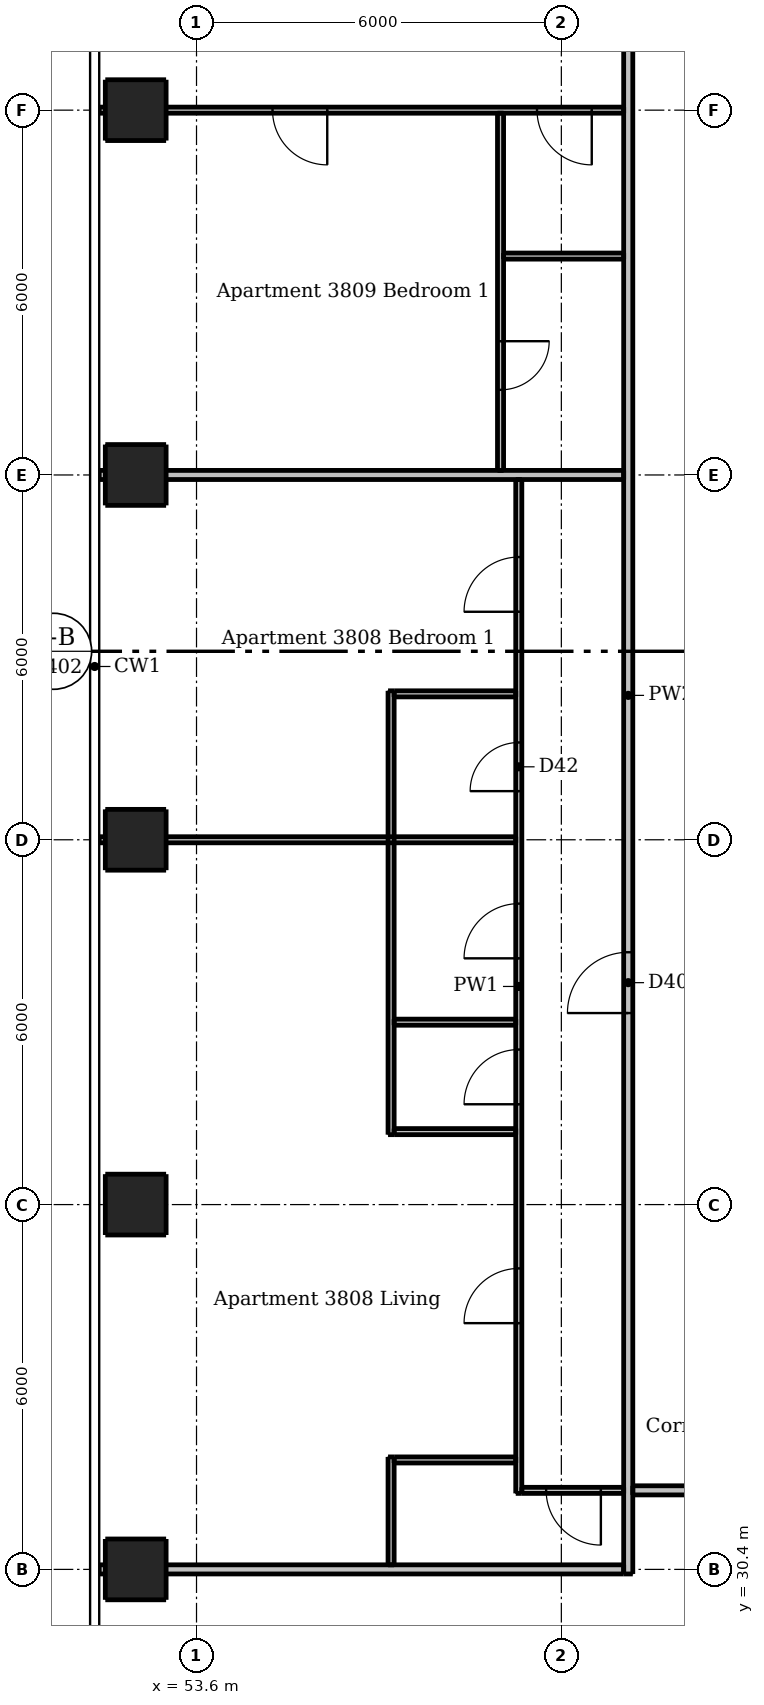
"""IFC4 building model, lengths in metres.
Left out: names, types, materials, properties, quantities, classifications, styles, units other than length and angle.
Written with IfcOpenShell. Run it as: python <this file> out.ifc"""

import sys

from ifc_helpers import new_model, si_unit, direction, frame, frame_2d, origin, origin_2d, place, context, subcontext, project, spatial, rectangle, extrude, element, fill, save


model = new_model("IFC4")
c1 = context("Model", 3, precision=1e-05, world=origin(), true_north=direction((0.0, 1.0)))
c2 = subcontext(c1, "Body", "Model", "MODEL_VIEW")
j1 = project(units=[si_unit("LENGTHUNIT", "METRE"), si_unit("PLANEANGLEUNIT", "RADIAN")], contexts=[c1])
p1 = place(None, origin())
s1 = spatial("IfcSite", under=j1, at=p1, CompositionType="ELEMENT")
p2 = place(p1, origin())
s2 = spatial("IfcBuilding", under=s1, at=p2, CompositionType="ELEMENT")
p3 = place(p2, frame((0.0, 0.0, 143.8)))
s3 = spatial("IfcBuildingStorey", under=s2, at=p3, CompositionType="ELEMENT", Elevation=143.8)
for number, where, z_axis, x_axis in (
    (1, (52.6, 30.4, 0.0), (0.0, 0.0, 1.0), (1.0, 0.0, 0.0)),
    (2, (52.6, 36.4, 0.0), (0.0, 0.0, 1.0), (1.0, 0.0, 0.0)),
    (3, (52.6, 42.4, 0.0), (0.0, 0.0, 1.0), (1.0, 0.0, 0.0)),
    (4, (52.6, 48.4, 0.0), (0.0, 0.0, 1.0), (1.0, 0.0, 0.0)),
    (5, (52.6, 54.4, 0.0), (0.0, 0.0, 1.0), (1.0, 0.0, 0.0)),
):
    element("IfcColumn", number, at=place(p3, frame(where, z_axis=z_axis, x_axis=x_axis)), inside=s3, PredefinedType="COLUMN", context=c2, shape_type="SweptSolid", body=[
        extrude(rectangle(XDim=1.0, YDim=1.0, at=origin_2d()), origin(), (0.0, 0.0, 1.0), 3.05),
    ])
p4 = place(p3, frame((56.8, 30.475, 0.0), z_axis=(0.0, 0.0, 1.0), x_axis=(0.0, 1.0, 0.0)))
e6 = element("IfcWall", 6, at=p4, inside=s3, PredefinedType="PARTITIONING", context=c2, shape_type="SweptSolid", body=[
    extrude(rectangle(XDim=1.775, YDim=0.1, at=frame_2d((0.887, 0.0))), origin(), (0.0, 0.0, 1.0), 3.05),
])
p5 = place(p3, frame((56.8, 37.55, 0.0), z_axis=(0.0, 0.0, 1.0), x_axis=(0.0, 1.0, 0.0)))
e7 = element("IfcWall", 7, at=p5, inside=s3, PredefinedType="PARTITIONING", context=c2, shape_type="SweptSolid", body=[
    extrude(rectangle(XDim=7.3, YDim=0.1, at=frame_2d((3.65, 0.0))), origin(), (0.0, 0.0, 1.0), 3.05),
])
p6 = place(p3, frame((58.6, 54.35, 0.0), z_axis=(0.0, 0.0, 1.0), x_axis=(0.0, -1.0, 0.0)))
e8 = element("IfcWall", 8, at=p6, inside=s3, PredefinedType="PARTITIONING", context=c2, shape_type="SweptSolid", body=[
    extrude(rectangle(XDim=5.875, YDim=0.1, at=frame_2d((2.938, 0.0))), origin(), (0.0, 0.0, 1.0), 3.05),
])
p7 = place(p6, frame((3.75, 0.0, 0.0)))
e9 = element("IfcOpeningElement", 9, at=p7, cuts=e8, PredefinedType="OPENING", context=c2, shape_type="SweptSolid", body=[
    extrude(rectangle(XDim=0.8, YDim=2.1, at=frame_2d((0.4, 1.05))), frame((0.0, 0.06, 0.0), z_axis=(0.0, -1.0, 0.0), x_axis=(1.0, 0.0, 0.0)), (0.0, 0.0, 1.0), 0.12),
])
p8 = place(p3, frame((58.9, 31.65, 0.0), z_axis=(0.0, 0.0, 1.0), x_axis=(0.0, 1.0, 0.0)))
e10 = element("IfcWall", 10, at=p8, inside=s3, PredefinedType="PARTITIONING", context=c2, shape_type="SweptSolid", body=[
    extrude(rectangle(XDim=16.675, YDim=0.1, at=frame_2d((8.337, 0.0))), origin(), (0.0, 0.0, 1.0), 3.05),
])
p9 = place(p8, frame((2.8, 0.0, 0.0)))
e11 = element("IfcOpeningElement", 11, at=p9, cuts=e10, PredefinedType="OPENING", context=c2, shape_type="SweptSolid", body=[
    extrude(rectangle(XDim=0.9, YDim=2.1, at=frame_2d((0.45, 1.05))), frame((0.0, 0.06, 0.0), z_axis=(0.0, -1.0, 0.0), x_axis=(1.0, 0.0, 0.0)), (0.0, 0.0, 1.0), 0.12),
])
p10 = place(p8, frame((8.8, 0.0, 0.0)))
e12 = element("IfcOpeningElement", 12, at=p10, cuts=e10, PredefinedType="OPENING", context=c2, shape_type="SweptSolid", body=[
    extrude(rectangle(XDim=0.9, YDim=2.1, at=frame_2d((0.45, 1.05))), frame((0.0, 0.06, 0.0), z_axis=(0.0, -1.0, 0.0), x_axis=(1.0, 0.0, 0.0)), (0.0, 0.0, 1.0), 0.12),
])
p11 = place(p8, frame((6.4, 0.0, 0.0)))
e13 = element("IfcOpeningElement", 13, at=p11, cuts=e10, PredefinedType="OPENING", context=c2, shape_type="SweptSolid", body=[
    extrude(rectangle(XDim=0.9, YDim=2.1, at=frame_2d((0.45, 1.05))), frame((0.0, 0.06, 0.0), z_axis=(0.0, -1.0, 0.0), x_axis=(1.0, 0.0, 0.0)), (0.0, 0.0, 1.0), 0.12),
])
p12 = place(p8, frame((14.5, 0.0, 0.0)))
e14 = element("IfcOpeningElement", 14, at=p12, cuts=e10, PredefinedType="OPENING", context=c2, shape_type="SweptSolid", body=[
    extrude(rectangle(XDim=0.9, YDim=2.1, at=frame_2d((0.45, 1.05))), frame((0.0, 0.06, 0.0), z_axis=(0.0, -1.0, 0.0), x_axis=(1.0, 0.0, 0.0)), (0.0, 0.0, 1.0), 0.12),
])
p13 = place(p8, frame((11.55, 0.0, 0.0)))
e15 = element("IfcOpeningElement", 15, at=p13, cuts=e10, PredefinedType="OPENING", context=c2, shape_type="SweptSolid", body=[
    extrude(rectangle(XDim=0.8, YDim=2.1, at=frame_2d((0.4, 1.05))), frame((0.0, 0.06, 0.0), z_axis=(0.0, -1.0, 0.0), x_axis=(1.0, 0.0, 0.0)), (0.0, 0.0, 1.0), 0.12),
])
p14 = place(p3, frame((60.625, 54.4, 0.0), z_axis=(0.0, 0.0, 1.0), x_axis=(-1.0, 0.0, 0.0)))
e16 = element("IfcWall", 16, at=p14, inside=s3, PredefinedType="PARTITIONING", context=c2, shape_type="SweptSolid", body=[
    extrude(rectangle(XDim=8.625, YDim=0.1, at=frame_2d((4.312, 0.0))), origin(), (0.0, 0.0, 1.0), 2.516),
])
p15 = place(p14, frame((0.525, 0.0, 0.0)))
e17 = element("IfcOpeningElement", 17, at=p15, cuts=e16, PredefinedType="OPENING", context=c2, shape_type="SweptSolid", body=[
    extrude(rectangle(XDim=0.9, YDim=2.1, at=frame_2d((0.45, 1.05))), frame((0.0, 0.06, 0.0), z_axis=(0.0, -1.0, 0.0), x_axis=(1.0, 0.0, 0.0)), (0.0, 0.0, 1.0), 0.12),
])
p16 = place(p14, frame((4.875, 0.0, 0.0)))
e18 = element("IfcOpeningElement", 18, at=p16, cuts=e16, PredefinedType="OPENING", context=c2, shape_type="SweptSolid", body=[
    extrude(rectangle(XDim=0.9, YDim=2.1, at=frame_2d((0.45, 1.05))), frame((0.0, 0.06, 0.0), z_axis=(0.0, -1.0, 0.0), x_axis=(1.0, 0.0, 0.0)), (0.0, 0.0, 1.0), 0.12),
])
p17 = place(p3, frame((58.65, 52.0, 0.0), z_axis=(0.0, 0.0, 1.0), x_axis=(1.0, 0.0, 0.0)))
e19 = element("IfcWall", 19, at=p17, inside=s3, PredefinedType="PARTITIONING", context=c2, shape_type="SweptSolid", body=[
    extrude(rectangle(XDim=1.975, YDim=0.1, at=frame_2d((0.988, 0.0))), origin(), (0.0, 0.0, 1.0), 3.05),
])
p18 = place(p3, frame((56.85, 44.8, 0.0), z_axis=(0.0, 0.0, 1.0), x_axis=(1.0, 0.0, 0.0)))
e20 = element("IfcWall", 20, at=p18, inside=s3, PredefinedType="PARTITIONING", context=c2, shape_type="SweptSolid", body=[
    extrude(rectangle(XDim=2.0, YDim=0.1, at=frame_2d((1.0, 0.0))), origin(), (0.0, 0.0, 1.0), 3.05),
])
p19 = place(p3, frame((52.0, 42.4, 0.0), z_axis=(0.0, 0.0, 1.0), x_axis=(1.0, 0.0, 0.0)))
e21 = element("IfcWall", 21, at=p19, inside=s3, PredefinedType="PARTITIONING", context=c2, shape_type="SweptSolid", body=[
    extrude(rectangle(XDim=6.85, YDim=0.1, at=frame_2d((3.425, 0.0))), origin(), (0.0, 0.0, 1.0), 2.516),
])
for number, where, z_axis, x_axis in (
    (22, (56.85, 39.4, 0.0), (0.0, 0.0, 1.0), (1.0, 0.0, 0.0)),
    (23, (56.85, 37.6, 0.0), (0.0, 0.0, 1.0), (1.0, 0.0, 0.0)),
    (24, (56.85, 32.2, 0.0), (0.0, 0.0, 1.0), (1.0, 0.0, 0.0)),
):
    element("IfcWall", number, at=place(p3, frame(where, z_axis=z_axis, x_axis=x_axis)), inside=s3, PredefinedType="PARTITIONING", context=c2, shape_type="SweptSolid", body=[
        extrude(rectangle(XDim=2.0, YDim=0.1, at=frame_2d((1.0, 0.0))), origin(), (0.0, 0.0, 1.0), 3.05),
    ])
p20 = place(p3, frame((60.625, 31.7, 0.0), z_axis=(0.0, 0.0, 1.0), x_axis=(-1.0, 0.0, 0.0)))
e25 = element("IfcWall", 25, at=p20, inside=s3, PredefinedType="PARTITIONING", context=c2, shape_type="SweptSolid", body=[
    extrude(rectangle(XDim=1.675, YDim=0.1, at=frame_2d((0.837, 0.0))), origin(), (0.0, 0.0, 1.0), 3.05),
])
p21 = place(p20, frame((0.375, 0.0, 0.0)))
e26 = element("IfcOpeningElement", 26, at=p21, cuts=e25, PredefinedType="OPENING", context=c2, shape_type="SweptSolid", body=[
    extrude(rectangle(XDim=0.9, YDim=2.1, at=frame_2d((0.45, 1.05))), frame((0.0, 0.06, 0.0), z_axis=(0.0, -1.0, 0.0), x_axis=(1.0, 0.0, 0.0)), (0.0, 0.0, 1.0), 0.12),
])
p22 = place(p3, frame((60.7, 30.325, 0.0), z_axis=(0.0, 0.0, 1.0), x_axis=(0.0, 1.0, 0.0)))
e27 = element("IfcWall", 27, at=p22, inside=s3, PredefinedType="PARTITIONING", context=c2, shape_type="SweptSolid", body=[
    extrude(rectangle(XDim=28.9, YDim=0.15, at=frame_2d((14.45, 0.0))), origin(), (0.0, 0.0, 1.0), 3.05),
])
p23 = place(p22, frame((9.225, 0.0, 0.0)))
e28 = element("IfcOpeningElement", 28, at=p23, cuts=e27, PredefinedType="OPENING", context=c2, shape_type="SweptSolid", body=[
    extrude(rectangle(XDim=1.0, YDim=2.1, at=frame_2d((0.5, 1.05))), frame((0.0, 0.085, 0.0), z_axis=(0.0, -1.0, 0.0), x_axis=(1.0, 0.0, 0.0)), (0.0, 0.0, 1.0), 0.17),
])
p24 = place(p22, frame((26.025, 0.0, 0.0)))
e29 = element("IfcOpeningElement", 29, at=p24, cuts=e27, PredefinedType="OPENING", context=c2, shape_type="SweptSolid", body=[
    extrude(rectangle(XDim=1.0, YDim=2.1, at=frame_2d((0.5, 1.05))), frame((0.0, 0.085, 0.0), z_axis=(0.0, -1.0, 0.0), x_axis=(1.0, 0.0, 0.0)), (0.0, 0.0, 1.0), 0.17),
])
p25 = place(p3, frame((52.0, 48.4, 0.0), z_axis=(0.0, 0.0, 1.0), x_axis=(1.0, 0.0, 0.0)))
e30 = element("IfcWall", 30, at=p25, inside=s3, PredefinedType="PARTITIONING", context=c2, shape_type="SweptSolid", body=[
    extrude(rectangle(XDim=8.625, YDim=0.15, at=frame_2d((4.312, 0.0))), origin(), (0.0, 0.0, 1.0), 2.516),
])
p26 = place(p3, frame((89.525, 31.7, 0.0), z_axis=(0.0, 0.0, 1.0), x_axis=(-1.0, 0.0, 0.0)))
e31 = element("IfcWall", 31, at=p26, inside=s3, PredefinedType="PARTITIONING", context=c2, shape_type="SweptSolid", body=[
    extrude(rectangle(XDim=28.75, YDim=0.15, at=frame_2d((14.375, 0.0))), origin(), (0.0, 0.0, 1.0), 3.05),
])
p27 = place(p26, frame((25.875, 0.0, 0.0)))
e32 = element("IfcOpeningElement", 32, at=p27, cuts=e31, PredefinedType="OPENING", context=c2, shape_type="SweptSolid", body=[
    extrude(rectangle(XDim=1.0, YDim=2.1, at=frame_2d((0.5, 1.05))), frame((0.0, 0.085, 0.0), z_axis=(0.0, -1.0, 0.0), x_axis=(1.0, 0.0, 0.0)), (0.0, 0.0, 1.0), 0.17),
])
p28 = place(p26, frame((9.925, 0.0, 0.0)))
e33 = element("IfcOpeningElement", 33, at=p28, cuts=e31, PredefinedType="OPENING", context=c2, shape_type="SweptSolid", body=[
    extrude(rectangle(XDim=1.0, YDim=2.1, at=frame_2d((0.5, 1.05))), frame((0.0, 0.085, 0.0), z_axis=(0.0, -1.0, 0.0), x_axis=(1.0, 0.0, 0.0)), (0.0, 0.0, 1.0), 0.17),
])
p29 = place(p3, frame((52.0, 30.4, 0.0), z_axis=(0.0, 0.0, 1.0), x_axis=(1.0, 0.0, 0.0)))
e34 = element("IfcWall", 34, at=p29, inside=s3, PredefinedType="PARTITIONING", context=c2, shape_type="SweptSolid", body=[
    extrude(rectangle(XDim=8.625, YDim=0.15, at=frame_2d((4.312, 0.0))), origin(), (0.0, 0.0, 1.0), 2.647),
])
p30 = place(p23, origin())
e35 = element("IfcDoor", 35, at=p30, inside=s3, OperationType="SINGLE_SWING_LEFT", PredefinedType="DOOR", context=c2, shape_type="SweptSolid", body=[
    extrude(rectangle(XDim=1.0, YDim=2.1, at=frame_2d((0.5, 1.05))), frame((0.0, 0.025, 0.0), z_axis=(0.0, -1.0, 0.0), x_axis=(1.0, 0.0, 0.0)), (0.0, 0.0, 1.0), 0.05),
])
fill(e28, e35)
p31 = place(p9, origin())
e36 = element("IfcDoor", 36, at=p31, inside=s3, OperationType="SINGLE_SWING_LEFT", PredefinedType="DOOR", context=c2, shape_type="SweptSolid", body=[
    extrude(rectangle(XDim=0.9, YDim=2.1, at=frame_2d((0.45, 1.05))), frame((0.0, 0.025, 0.0), z_axis=(0.0, -1.0, 0.0), x_axis=(1.0, 0.0, 0.0)), (0.0, 0.0, 1.0), 0.05),
])
fill(e11, e36)
p32 = place(p10, origin())
e37 = element("IfcDoor", 37, at=p32, inside=s3, OperationType="SINGLE_SWING_LEFT", PredefinedType="DOOR", context=c2, shape_type="SweptSolid", body=[
    extrude(rectangle(XDim=0.9, YDim=2.1, at=frame_2d((0.45, 1.05))), frame((0.0, 0.025, 0.0), z_axis=(0.0, -1.0, 0.0), x_axis=(1.0, 0.0, 0.0)), (0.0, 0.0, 1.0), 0.05),
])
fill(e12, e37)
p33 = place(p11, origin())
e38 = element("IfcDoor", 38, at=p33, inside=s3, OperationType="SINGLE_SWING_LEFT", PredefinedType="DOOR", context=c2, shape_type="SweptSolid", body=[
    extrude(rectangle(XDim=0.9, YDim=2.1, at=frame_2d((0.45, 1.05))), frame((0.0, 0.025, 0.0), z_axis=(0.0, -1.0, 0.0), x_axis=(1.0, 0.0, 0.0)), (0.0, 0.0, 1.0), 0.05),
])
fill(e13, e38)
p34 = place(p21, origin())
e39 = element("IfcDoor", 39, at=p34, inside=s3, OperationType="SINGLE_SWING_LEFT", PredefinedType="DOOR", context=c2, shape_type="SweptSolid", body=[
    extrude(rectangle(XDim=0.9, YDim=2.1, at=frame_2d((0.45, 1.05))), frame((0.0, 0.025, 0.0), z_axis=(0.0, -1.0, 0.0), x_axis=(1.0, 0.0, 0.0)), (0.0, 0.0, 1.0), 0.05),
])
fill(e26, e39)
p35 = place(p12, origin())
e40 = element("IfcDoor", 40, at=p35, inside=s3, OperationType="SINGLE_SWING_LEFT", PredefinedType="DOOR", context=c2, shape_type="SweptSolid", body=[
    extrude(rectangle(XDim=0.9, YDim=2.1, at=frame_2d((0.45, 1.05))), frame((0.0, 0.025, 0.0), z_axis=(0.0, -1.0, 0.0), x_axis=(1.0, 0.0, 0.0)), (0.0, 0.0, 1.0), 0.05),
])
fill(e14, e40)
p36 = place(p13, origin())
e41 = element("IfcDoor", 41, at=p36, inside=s3, OperationType="SINGLE_SWING_LEFT", PredefinedType="DOOR", context=c2, shape_type="SweptSolid", body=[
    extrude(rectangle(XDim=0.8, YDim=2.1, at=frame_2d((0.4, 1.05))), frame((0.0, 0.025, 0.0), z_axis=(0.0, -1.0, 0.0), x_axis=(1.0, 0.0, 0.0)), (0.0, 0.0, 1.0), 0.05),
])
fill(e15, e41)
p37 = place(p15, origin())
e42 = element("IfcDoor", 42, at=p37, inside=s3, OperationType="SINGLE_SWING_LEFT", PredefinedType="DOOR", context=c2, shape_type="SweptSolid", body=[
    extrude(rectangle(XDim=0.9, YDim=2.1, at=frame_2d((0.45, 1.05))), frame((0.0, 0.025, 0.0), z_axis=(0.0, -1.0, 0.0), x_axis=(1.0, 0.0, 0.0)), (0.0, 0.0, 1.0), 0.05),
])
fill(e17, e42)
p38 = place(p16, origin())
e43 = element("IfcDoor", 43, at=p38, inside=s3, OperationType="SINGLE_SWING_LEFT", PredefinedType="DOOR", context=c2, shape_type="SweptSolid", body=[
    extrude(rectangle(XDim=0.9, YDim=2.1, at=frame_2d((0.45, 1.05))), frame((0.0, 0.025, 0.0), z_axis=(0.0, -1.0, 0.0), x_axis=(1.0, 0.0, 0.0)), (0.0, 0.0, 1.0), 0.05),
])
fill(e18, e43)
p39 = place(p7, origin())
e44 = element("IfcDoor", 44, at=p39, inside=s3, OperationType="SINGLE_SWING_LEFT", PredefinedType="DOOR", context=c2, shape_type="SweptSolid", body=[
    extrude(rectangle(XDim=0.8, YDim=2.1, at=frame_2d((0.4, 1.05))), frame((0.0, 0.025, 0.0), z_axis=(0.0, -1.0, 0.0), x_axis=(1.0, 0.0, 0.0)), (0.0, 0.0, 1.0), 0.05),
])
fill(e9, e44)
save(model, sys.argv[1])
